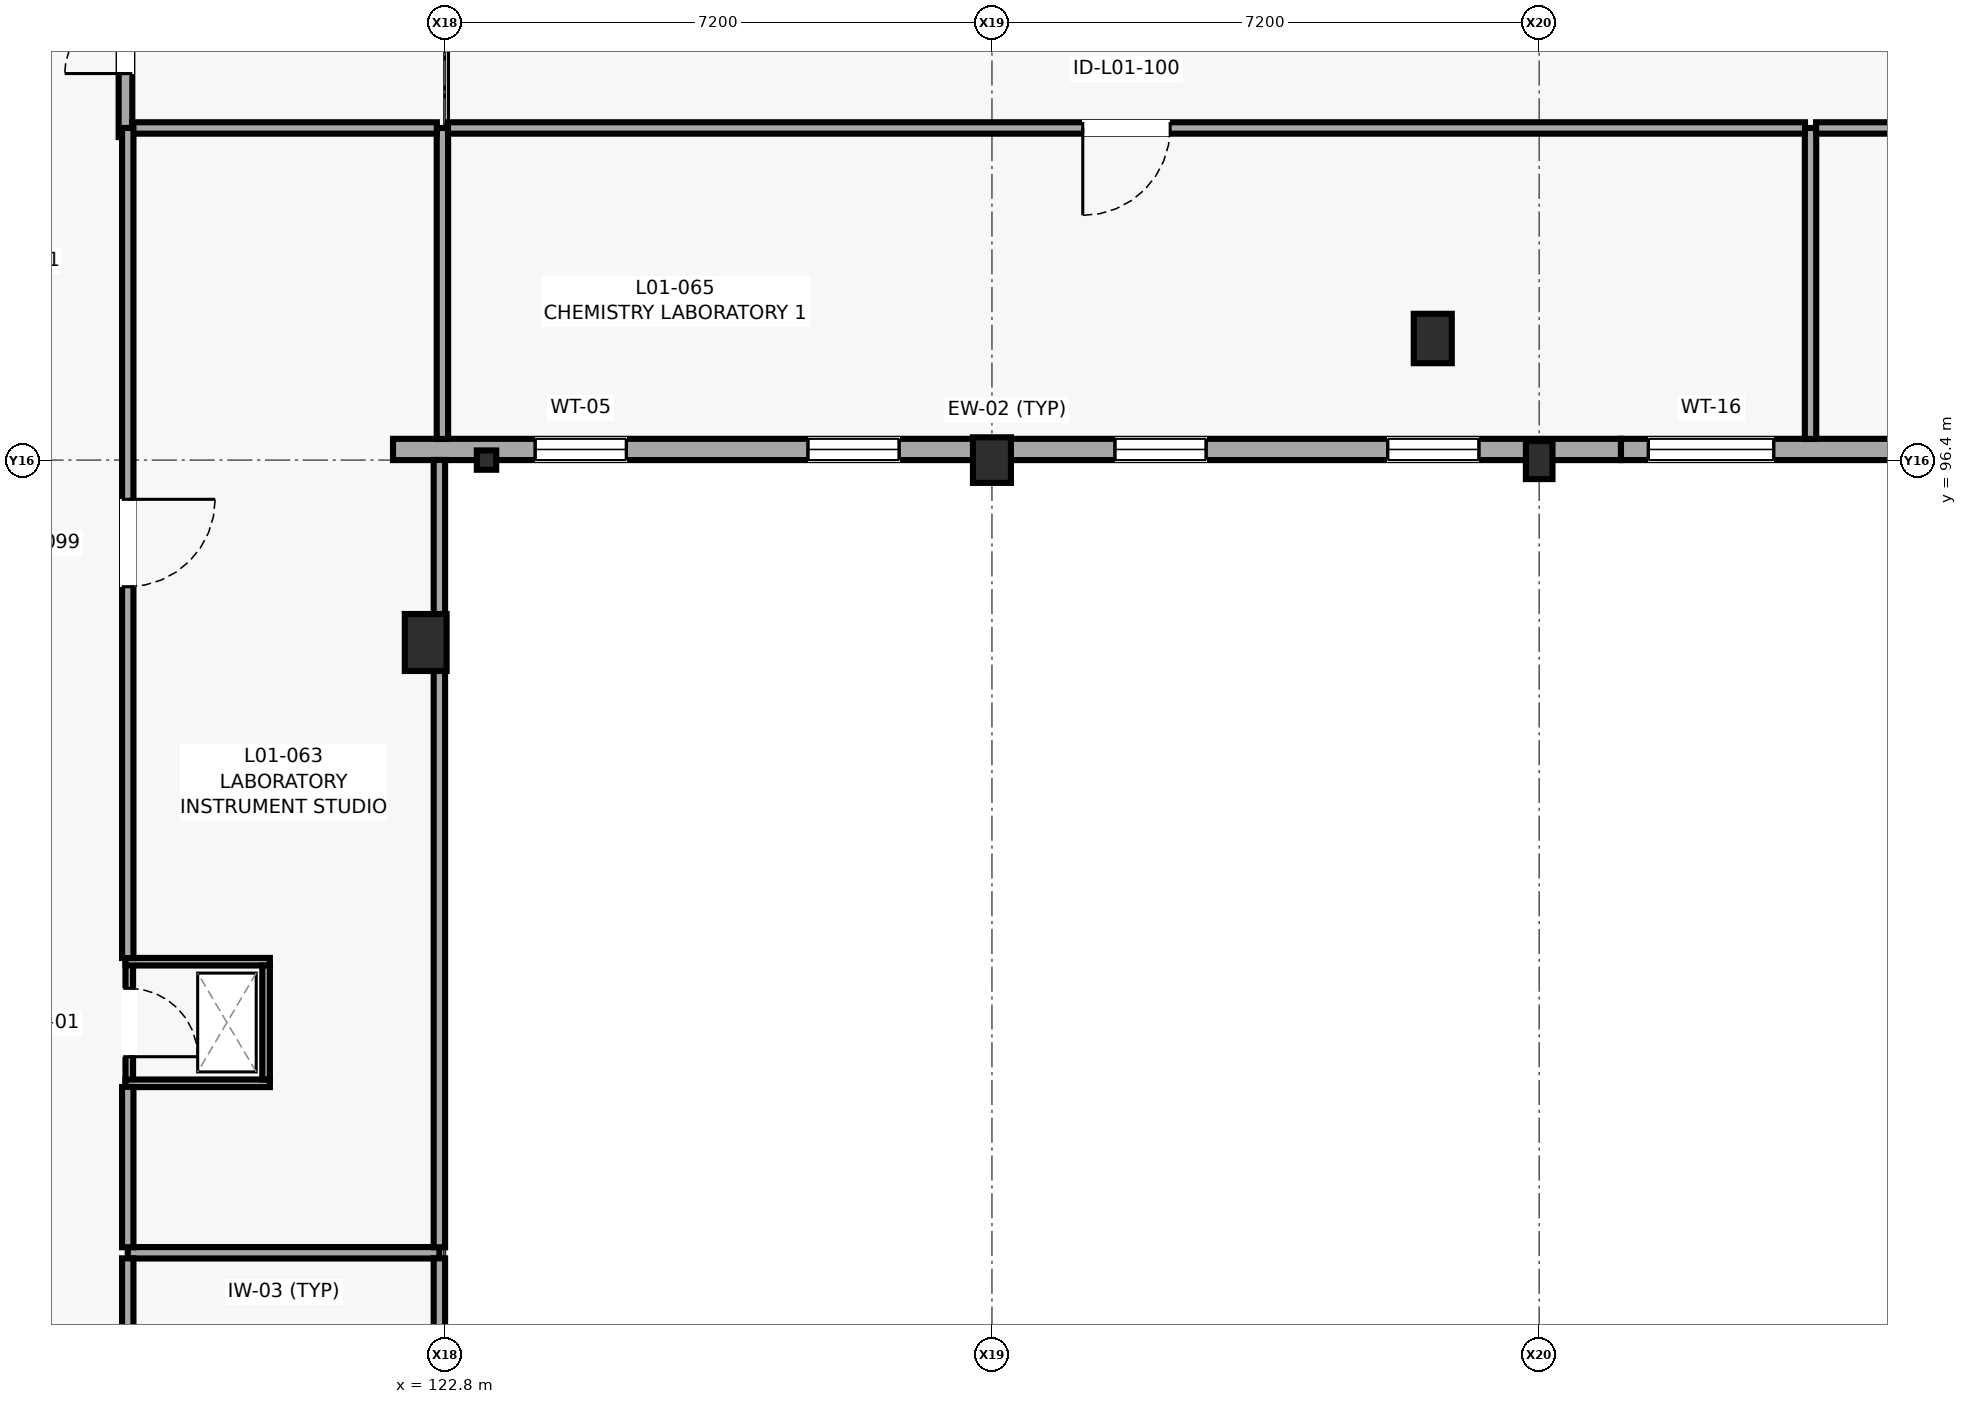
"""IFC4 building model, lengths in metres.
Left out: names, types, materials, properties, quantities, classifications, styles, units other than length and angle.
Written with IfcOpenShell. Run it as: python <this file> out.ifc"""

import sys

from ifc_helpers import new_model, si_unit, direction, frame, frame_2d, origin, origin_2d, place, context, subcontext, project, spatial, rectangle, i_section, extrude, element, fill, save


model = new_model("IFC4")
c1 = context("Model", 3, precision=1e-05, world=origin(), true_north=direction((0.0, 1.0)))
c2 = subcontext(c1, "Body", "Model", "MODEL_VIEW")
j1 = project(units=[si_unit("LENGTHUNIT", "METRE"), si_unit("PLANEANGLEUNIT", "RADIAN")], contexts=[c1])
p1 = place(None, origin())
s1 = spatial("IfcSite", under=j1, at=p1, CompositionType="ELEMENT")
p2 = place(p1, origin())
s2 = spatial("IfcBuilding", under=s1, at=p2, CompositionType="ELEMENT")
p3 = place(p2, frame((0.0, 0.0, 4.2)))
s3 = spatial("IfcBuildingStorey", under=s2, at=p3, CompositionType="ELEMENT", Elevation=4.2)
p4 = place(p3, frame((122.55, 94.0, 0.0), z_axis=(0.0, 0.0, 1.0), x_axis=(1.0, 0.0, 0.0)))
e1 = element("IfcColumn", 1, at=p4, inside=s3, PredefinedType="COLUMN", context=c2, shape_type="SweptSolid", body=[
    extrude(rectangle(XDim=0.55, YDim=0.75, at=origin_2d()), origin(), (0.0, 0.0, 1.0), 4.0),
])
p5 = place(p3, frame((123.35, 96.4, 0.0), z_axis=(0.0, 0.0, 1.0), x_axis=(1.0, 0.0, 0.0)))
e2 = element("IfcColumn", 2, at=p5, inside=s3, PredefinedType="COLUMN", context=c2, shape_type="SweptSolid", body=[
    extrude(i_section(OverallWidth=0.255, OverallDepth=0.254, WebThickness=0.009, FlangeThickness=0.014, FilletRadius=0.013, at=origin_2d()), origin(), (0.0, 0.0, 1.0), 4.0),
])
p6 = place(p3, frame((130.0, 96.4, 0.0), z_axis=(0.0, 0.0, 1.0), x_axis=(1.0, 0.0, 0.0)))
e3 = element("IfcColumn", 3, at=p6, inside=s3, PredefinedType="PILASTER", context=c2, shape_type="SweptSolid", body=[
    extrude(rectangle(XDim=0.5, YDim=0.6, at=origin_2d()), origin(), (0.0, 0.0, 1.0), 4.0),
])
p7 = place(p3, frame((135.8, 98.0, 0.0), z_axis=(0.0, 0.0, 1.0), x_axis=(1.0, 0.0, 0.0)))
e4 = element("IfcColumn", 4, at=p7, inside=s3, PredefinedType="COLUMN", context=c2, shape_type="SweptSolid", body=[
    extrude(rectangle(XDim=0.5, YDim=0.65, at=origin_2d()), origin(), (0.0, 0.0, 1.0), 4.0),
])
p8 = place(p3, frame((137.2, 96.4, 0.0), z_axis=(0.0, 0.0, 1.0), x_axis=(1.0, 0.0, 0.0)))
e5 = element("IfcColumn", 5, at=p8, inside=s3, PredefinedType="PILASTER", context=c2, shape_type="SweptSolid", body=[
    extrude(rectangle(XDim=0.35, YDim=0.5, at=origin_2d()), origin(), (0.0, 0.0, 1.0), 4.0),
])
p9 = place(p3, frame((122.12, 96.54, 0.0), z_axis=(0.0, 0.0, 1.0), x_axis=(1.0, 0.0, 0.0)))
e6 = element("IfcWall", 6, at=p9, inside=s3, PredefinedType="SOLIDWALL", context=c2, shape_type="SweptSolid", body=[
    extrude(rectangle(XDim=16.156, YDim=0.28, at=frame_2d((8.078, 0.0))), origin(), (0.0, 0.0, 1.0), 2.815),
])
p10 = place(p9, frame((1.87, 0.0, 0.85)))
e7 = element("IfcOpeningElement", 7, at=p10, cuts=e6, PredefinedType="OPENING", context=c2, shape_type="SweptSolid", body=[
    extrude(rectangle(XDim=1.2, YDim=1.65, at=frame_2d((0.6, 0.825))), frame((0.0, 0.15, 0.0), z_axis=(0.0, -1.0, 0.0), x_axis=(1.0, 0.0, 0.0)), (0.0, 0.0, 1.0), 0.3),
])
p11 = place(p9, frame((5.459, 0.0, 0.85)))
e8 = element("IfcOpeningElement", 8, at=p11, cuts=e6, PredefinedType="OPENING", context=c2, shape_type="SweptSolid", body=[
    extrude(rectangle(XDim=1.2, YDim=1.65, at=frame_2d((0.6, 0.825))), frame((0.0, 0.15, 0.0), z_axis=(0.0, -1.0, 0.0), x_axis=(1.0, 0.0, 0.0)), (0.0, 0.0, 1.0), 0.3),
])
p12 = place(p9, frame((9.498, 0.0, 0.85)))
e9 = element("IfcOpeningElement", 9, at=p12, cuts=e6, PredefinedType="OPENING", context=c2, shape_type="SweptSolid", body=[
    extrude(rectangle(XDim=1.2, YDim=1.65, at=frame_2d((0.6, 0.825))), frame((0.0, 0.15, 0.0), z_axis=(0.0, -1.0, 0.0), x_axis=(1.0, 0.0, 0.0)), (0.0, 0.0, 1.0), 0.3),
])
p13 = place(p9, frame((13.087, 0.0, 0.85)))
e10 = element("IfcOpeningElement", 10, at=p13, cuts=e6, PredefinedType="OPENING", context=c2, shape_type="SweptSolid", body=[
    extrude(rectangle(XDim=1.2, YDim=1.65, at=frame_2d((0.6, 0.825))), frame((0.0, 0.15, 0.0), z_axis=(0.0, -1.0, 0.0), x_axis=(1.0, 0.0, 0.0)), (0.0, 0.0, 1.0), 0.3),
])
p14 = place(p3, frame((138.276, 96.54, 0.0), z_axis=(0.0, 0.0, 1.0), x_axis=(1.0, 0.0, 0.0)))
e11 = element("IfcWall", 11, at=p14, inside=s3, PredefinedType="SOLIDWALL", context=c2, shape_type="SweptSolid", body=[
    extrude(rectangle(XDim=16.155, YDim=0.28, at=frame_2d((8.078, 0.0))), origin(), (0.0, 0.0, 1.0), 3.015),
])
p15 = place(p14, frame((0.36, 0.0, 0.85)))
e12 = element("IfcOpeningElement", 12, at=p15, cuts=e11, PredefinedType="OPENING", context=c2, shape_type="SweptSolid", body=[
    extrude(rectangle(XDim=1.65, YDim=1.95, at=frame_2d((0.825, 0.975))), frame((0.0, 0.15, 0.0), z_axis=(0.0, -1.0, 0.0), x_axis=(1.0, 0.0, 0.0)), (0.0, 0.0, 1.0), 0.3),
])
p16 = place(p14, frame((4.758, 0.0, 1.05)))
e13 = element("IfcOpeningElement", 13, at=p16, cuts=e11, PredefinedType="OPENING", context=c2, shape_type="SweptSolid", body=[
    extrude(rectangle(XDim=0.9, YDim=1.5, at=frame_2d((0.45, 0.75))), frame((0.0, 0.15, 0.0), z_axis=(0.0, -1.0, 0.0), x_axis=(1.0, 0.0, 0.0)), (0.0, 0.0, 1.0), 0.3),
])
p17 = place(p14, frame((9.322, 0.0, 0.85)))
e14 = element("IfcOpeningElement", 14, at=p17, cuts=e11, PredefinedType="OPENING", context=c2, shape_type="SweptSolid", body=[
    extrude(rectangle(XDim=1.55, YDim=1.85, at=frame_2d((0.775, 0.925))), frame((0.0, 0.15, 0.0), z_axis=(0.0, -1.0, 0.0), x_axis=(1.0, 0.0, 0.0)), (0.0, 0.0, 1.0), 0.3),
])
p18 = place(p14, frame((14.045, 0.0, 0.75)))
e15 = element("IfcOpeningElement", 15, at=p18, cuts=e11, PredefinedType="OPENING", context=c2, shape_type="SweptSolid", body=[
    extrude(rectangle(XDim=1.75, YDim=2.05, at=frame_2d((0.875, 1.025))), frame((0.0, 0.15, 0.0), z_axis=(0.0, -1.0, 0.0), x_axis=(1.0, 0.0, 0.0)), (0.0, 0.0, 1.0), 0.3),
])
p19 = place(p3, frame((118.6, 100.65, 0.0), z_axis=(0.0, 0.0, 1.0), x_axis=(0.0, 1.0, 0.0)))
e16 = element("IfcWall", 16, at=p19, inside=s3, PredefinedType="PARTITIONING", context=c2, shape_type="SweptSolid", body=[
    extrude(rectangle(XDim=3.272, YDim=0.18, at=frame_2d((1.636, 0.0))), origin(), (0.0, 0.0, 1.0), 3.78),
])
p20 = place(p19, frame((0.836, 0.0, 0.0)))
e17 = element("IfcOpeningElement", 17, at=p20, cuts=e16, PredefinedType="OPENING", context=c2, shape_type="SweptSolid", body=[
    extrude(rectangle(XDim=1.6, YDim=2.25, at=frame_2d((0.8, 1.125))), frame((0.0, 0.1, 0.0), z_axis=(0.0, -1.0, 0.0), x_axis=(1.0, 0.0, 0.0)), (0.0, 0.0, 1.0), 0.2),
])
p21 = place(p3, frame((118.65, 88.2, 0.0), z_axis=(0.0, 0.0, 1.0), x_axis=(0.0, 1.0, 0.0)))
e18 = element("IfcWall", 18, at=p21, inside=s3, PredefinedType="PARTITIONING", context=c2, shape_type="SweptSolid", body=[
    extrude(rectangle(XDim=1.6, YDim=0.1, at=frame_2d((0.8, 0.0))), origin(), (0.0, 0.0, 1.0), 3.215),
])
p22 = place(p21, frame((0.35, 0.0, 0.0)))
e19 = element("IfcOpeningElement", 19, at=p22, cuts=e18, PredefinedType="OPENING", context=c2, shape_type="SweptSolid", body=[
    extrude(rectangle(XDim=0.9, YDim=2.05, at=frame_2d((0.45, 1.025))), frame((0.0, 0.06, 0.0), z_axis=(0.0, -1.0, 0.0), x_axis=(1.0, 0.0, 0.0)), (0.0, 0.0, 1.0), 0.12),
])
for number, where, z_axis, x_axis in (
    (20, (118.6, 88.2, 0.0), (0.0, 0.0, 1.0), (1.0, 0.0, 0.0)),
    (21, (118.6, 89.8, 0.0), (0.0, 0.0, 1.0), (1.0, 0.0, 0.0)),
):
    element("IfcWall", number, at=place(p3, frame(where, z_axis=z_axis, x_axis=x_axis)), inside=s3, PredefinedType="PARTITIONING", context=c2, shape_type="SweptSolid", body=[
        extrude(rectangle(XDim=1.9, YDim=0.1, at=frame_2d((0.95, 0.0))), origin(), (0.0, 0.0, 1.0), 3.78),
    ])
p23 = place(p3, frame((120.45, 88.25, 0.0), z_axis=(0.0, 0.0, 1.0), x_axis=(0.0, 1.0, 0.0)))
e22 = element("IfcWall", 22, at=p23, inside=s3, PredefinedType="PARTITIONING", context=c2, shape_type="SweptSolid", body=[
    extrude(rectangle(XDim=1.5, YDim=0.1, at=frame_2d((0.75, 0.0))), origin(), (0.0, 0.0, 1.0), 3.78),
])
p24 = place(p3, frame((122.73, 85.97, 0.0), z_axis=(0.0, 0.0, 1.0), x_axis=(-1.0, 0.0, 0.0)))
e23 = element("IfcWall", 23, at=p24, inside=s3, PredefinedType="PARTITIONING", context=c2, shape_type="SweptSolid", body=[
    extrude(rectangle(XDim=4.1, YDim=0.15, at=frame_2d((2.05, 0.0))), origin(), (0.0, 0.0, 1.0), 3.715),
])
p25 = place(p3, frame((118.63, 85.897, 0.0), z_axis=(0.0, 0.0, 1.0), x_axis=(0.0, -1.0, 0.0)))
e24 = element("IfcWall", 24, at=p25, inside=s3, PredefinedType="PARTITIONING", context=c2, shape_type="SweptSolid", body=[
    extrude(rectangle(XDim=12.209, YDim=0.15, at=frame_2d((6.104, 0.0))), origin(), (0.0, 0.0, 1.0), 3.115),
])
p26 = place(p25, frame((5.63, 0.0, 0.0)))
e25 = element("IfcOpeningElement", 25, at=p26, cuts=e24, PredefinedType="OPENING", context=c2, shape_type="SweptSolid", body=[
    extrude(rectangle(XDim=0.95, YDim=2.1, at=frame_2d((0.475, 1.05))), frame((0.0, 0.085, 0.0), z_axis=(0.0, -1.0, 0.0), x_axis=(1.0, 0.0, 0.0)), (0.0, 0.0, 1.0), 0.17),
])
p27 = place(p3, frame((122.73, 71.878, 0.0), z_axis=(0.0, 0.0, 1.0), x_axis=(0.0, 1.0, 0.0)))
e26 = element("IfcWall", 26, at=p27, inside=s3, PredefinedType="PARTITIONING", context=c2, shape_type="SweptSolid", body=[
    extrude(rectangle(XDim=14.019, YDim=0.15, at=frame_2d((7.01, 0.0))), origin(), (0.0, 0.0, 1.0), 3.115),
])
p28 = place(p3, frame((122.77, 96.678, 0.0), z_axis=(0.0, 0.0, 1.0), x_axis=(0.0, 1.0, 0.0)))
e27 = element("IfcWall", 27, at=p28, inside=s3, PredefinedType="PARTITIONING", context=c2, shape_type="SweptSolid", body=[
    extrude(rectangle(XDim=4.092, YDim=0.15, at=frame_2d((2.046, 0.0))), origin(), (0.0, 0.0, 1.0), 3.715),
])
p29 = place(p3, frame((122.697, 100.77, 0.0), z_axis=(0.0, 0.0, 1.0), x_axis=(-1.0, 0.0, 0.0)))
e28 = element("IfcWall", 28, at=p29, inside=s3, PredefinedType="PARTITIONING", context=c2, shape_type="SweptSolid", body=[
    extrude(rectangle(XDim=4.009, YDim=0.15, at=frame_2d((2.004, 0.0))), origin(), (0.0, 0.0, 1.0), 3.715),
])
p30 = place(p3, frame((118.63, 100.77, 0.0), z_axis=(0.0, 0.0, 1.0), x_axis=(0.0, -1.0, 0.0)))
e29 = element("IfcWall", 29, at=p30, inside=s3, PredefinedType="PARTITIONING", context=c2, shape_type="SweptSolid", body=[
    extrude(rectangle(XDim=10.922, YDim=0.15, at=frame_2d((5.461, 0.0))), origin(), (0.0, 0.0, 1.0), 3.215),
])
p31 = place(p30, frame((4.886, 0.0, 0.0)))
e30 = element("IfcOpeningElement", 30, at=p31, cuts=e29, PredefinedType="OPENING", context=c2, shape_type="SweptSolid", body=[
    extrude(rectangle(XDim=1.15, YDim=2.2, at=frame_2d((0.575, 1.1))), frame((0.0, 0.085, 0.0), z_axis=(0.0, -1.0, 0.0), x_axis=(1.0, 0.0, 0.0)), (0.0, 0.0, 1.0), 0.17),
])
p32 = place(p3, frame((118.63, 88.152, 0.0), z_axis=(0.0, 0.0, 1.0), x_axis=(0.0, -1.0, 0.0)))
e31 = element("IfcWall", 31, at=p32, inside=s3, PredefinedType="PARTITIONING", context=c2, shape_type="SweptSolid", body=[
    extrude(rectangle(XDim=2.109, YDim=0.15, at=frame_2d((1.055, 0.0))), origin(), (0.0, 0.0, 1.0), 3.215),
])
p33 = place(p3, frame((122.73, 86.043, 0.0), z_axis=(0.0, 0.0, 1.0), x_axis=(0.0, 1.0, 0.0)))
e32 = element("IfcWall", 32, at=p33, inside=s3, PredefinedType="PARTITIONING", context=c2, shape_type="SweptSolid", body=[
    extrude(rectangle(XDim=10.359, YDim=0.15, at=frame_2d((5.18, 0.0))), origin(), (0.0, 0.0, 1.0), 3.215),
])
p34 = place(p3, frame((140.77, 96.678, 0.0), z_axis=(0.0, 0.0, 1.0), x_axis=(0.0, 1.0, 0.0)))
e33 = element("IfcWall", 33, at=p34, inside=s3, PredefinedType="PARTITIONING", context=c2, shape_type="SweptSolid", body=[
    extrude(rectangle(XDim=4.092, YDim=0.15, at=frame_2d((2.046, 0.0))), origin(), (0.0, 0.0, 1.0), 3.715),
])
p35 = place(p3, frame((140.697, 100.77, 0.0), z_axis=(0.0, 0.0, 1.0), x_axis=(-1.0, 0.0, 0.0)))
e34 = element("IfcWall", 34, at=p35, inside=s3, PredefinedType="PARTITIONING", context=c2, shape_type="SweptSolid", body=[
    extrude(rectangle(XDim=17.854, YDim=0.15, at=frame_2d((8.927, 0.0))), origin(), (0.0, 0.0, 1.0), 3.715),
])
p36 = place(p35, frame((8.352, 0.0, 0.0)))
e35 = element("IfcOpeningElement", 35, at=p36, cuts=e34, PredefinedType="OPENING", context=c2, shape_type="SweptSolid", body=[
    extrude(rectangle(XDim=1.15, YDim=2.2, at=frame_2d((0.575, 1.1))), frame((0.0, 0.085, 0.0), z_axis=(0.0, -1.0, 0.0), x_axis=(1.0, 0.0, 0.0)), (0.0, 0.0, 1.0), 0.17),
])
p37 = place(p3, frame((158.456, 100.77, 0.0), z_axis=(0.0, 0.0, 1.0), x_axis=(-1.0, 0.0, 0.0)))
e36 = element("IfcWall", 36, at=p37, inside=s3, PredefinedType="PARTITIONING", context=c2, shape_type="SweptSolid", body=[
    extrude(rectangle(XDim=17.613, YDim=0.15, at=frame_2d((8.807, 0.0))), origin(), (0.0, 0.0, 1.0), 3.715),
])
p38 = place(p37, frame((10.701, 0.0, 0.0)))
e37 = element("IfcOpeningElement", 37, at=p38, cuts=e36, PredefinedType="OPENING", context=c2, shape_type="SweptSolid", body=[
    extrude(rectangle(XDim=1.15, YDim=2.2, at=frame_2d((0.575, 1.1))), frame((0.0, 0.085, 0.0), z_axis=(0.0, -1.0, 0.0), x_axis=(1.0, 0.0, 0.0)), (0.0, 0.0, 1.0), 0.17),
])
p39 = place(p10, origin())
e38 = element("IfcWindow", 38, at=p39, inside=s3, PartitioningType="SINGLE_PANEL", PredefinedType="WINDOW", context=c2, shape_type="SweptSolid", body=[
    extrude(rectangle(XDim=1.2, YDim=1.65, at=frame_2d((0.6, 0.825))), frame((0.0, 0.03, 0.0), z_axis=(0.0, -1.0, 0.0), x_axis=(1.0, 0.0, 0.0)), (0.0, 0.0, 1.0), 0.06),
])
fill(e7, e38)
p40 = place(p11, origin())
e39 = element("IfcWindow", 39, at=p40, inside=s3, PartitioningType="SINGLE_PANEL", PredefinedType="WINDOW", context=c2, shape_type="SweptSolid", body=[
    extrude(rectangle(XDim=1.2, YDim=1.65, at=frame_2d((0.6, 0.825))), frame((0.0, 0.03, 0.0), z_axis=(0.0, -1.0, 0.0), x_axis=(1.0, 0.0, 0.0)), (0.0, 0.0, 1.0), 0.06),
])
fill(e8, e39)
p41 = place(p12, origin())
e40 = element("IfcWindow", 40, at=p41, inside=s3, PartitioningType="SINGLE_PANEL", PredefinedType="WINDOW", context=c2, shape_type="SweptSolid", body=[
    extrude(rectangle(XDim=1.2, YDim=1.65, at=frame_2d((0.6, 0.825))), frame((0.0, 0.03, 0.0), z_axis=(0.0, -1.0, 0.0), x_axis=(1.0, 0.0, 0.0)), (0.0, 0.0, 1.0), 0.06),
])
fill(e9, e40)
p42 = place(p13, origin())
e41 = element("IfcWindow", 41, at=p42, inside=s3, PartitioningType="SINGLE_PANEL", PredefinedType="WINDOW", context=c2, shape_type="SweptSolid", body=[
    extrude(rectangle(XDim=1.2, YDim=1.65, at=frame_2d((0.6, 0.825))), frame((0.0, 0.03, 0.0), z_axis=(0.0, -1.0, 0.0), x_axis=(1.0, 0.0, 0.0)), (0.0, 0.0, 1.0), 0.06),
])
fill(e10, e41)
p43 = place(p15, origin())
e42 = element("IfcWindow", 42, at=p43, inside=s3, PartitioningType="SINGLE_PANEL", PredefinedType="WINDOW", context=c2, shape_type="SweptSolid", body=[
    extrude(rectangle(XDim=1.65, YDim=1.95, at=frame_2d((0.825, 0.975))), frame((0.0, 0.03, 0.0), z_axis=(0.0, -1.0, 0.0), x_axis=(1.0, 0.0, 0.0)), (0.0, 0.0, 1.0), 0.06),
])
fill(e12, e42)
p44 = place(p20, origin())
e43 = element("IfcDoor", 43, at=p44, inside=s3, OperationType="DOUBLE_DOOR_SINGLE_SWING", PredefinedType="DOOR", context=c2, shape_type="SweptSolid", body=[
    extrude(rectangle(XDim=1.6, YDim=2.25, at=frame_2d((0.8, 1.125))), frame((0.0, 0.025, 0.0), z_axis=(0.0, -1.0, 0.0), x_axis=(1.0, 0.0, 0.0)), (0.0, 0.0, 1.0), 0.05),
])
fill(e17, e43)
p45 = place(p22, frame((0.9, 0.0, 0.0), z_axis=(0.0, 0.0, 1.0), x_axis=(-1.0, 0.0, 0.0)))
e44 = element("IfcDoor", 44, at=p45, inside=s3, OperationType="SINGLE_SWING_LEFT", PredefinedType="USERDEFINED", context=c2, shape_type="SweptSolid", body=[
    extrude(rectangle(XDim=0.9, YDim=2.05, at=frame_2d((0.45, 1.025))), frame((0.0, 0.025, 0.0), z_axis=(0.0, -1.0, 0.0), x_axis=(1.0, 0.0, 0.0)), (0.0, 0.0, 1.0), 0.05),
])
fill(e19, e44)
p46 = place(p31, origin())
e45 = element("IfcDoor", 45, at=p46, inside=s3, OperationType="SINGLE_SWING_LEFT", PredefinedType="DOOR", context=c2, shape_type="SweptSolid", body=[
    extrude(rectangle(XDim=1.15, YDim=2.2, at=frame_2d((0.575, 1.1))), frame((0.0, 0.025, 0.0), z_axis=(0.0, -1.0, 0.0), x_axis=(1.0, 0.0, 0.0)), (0.0, 0.0, 1.0), 0.05),
])
fill(e30, e45)
p47 = place(p36, origin())
e46 = element("IfcDoor", 46, at=p47, inside=s3, OperationType="SINGLE_SWING_RIGHT", PredefinedType="DOOR", context=c2, shape_type="SweptSolid", body=[
    extrude(rectangle(XDim=1.15, YDim=2.2, at=frame_2d((0.575, 1.1))), frame((0.0, 0.025, 0.0), z_axis=(0.0, -1.0, 0.0), x_axis=(1.0, 0.0, 0.0)), (0.0, 0.0, 1.0), 0.05),
])
fill(e35, e46)
save(model, sys.argv[1])
